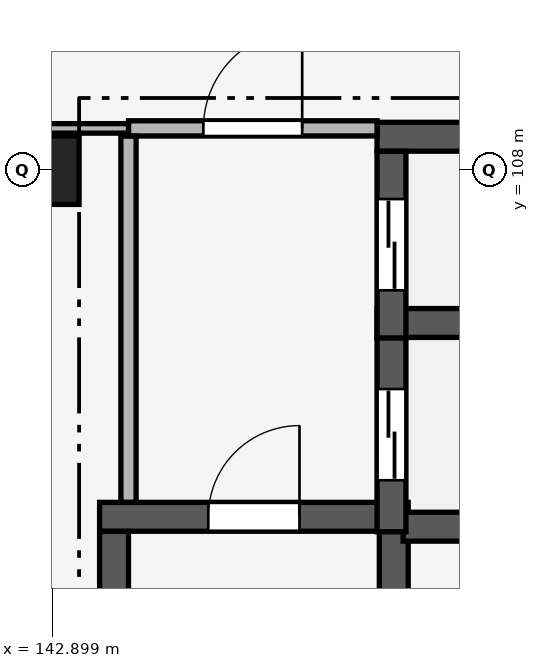
"""IFC4 building model, lengths in metres.
Left out: names, types, materials, properties, quantities, classifications, styles, units other than length and angle.
Written with IfcOpenShell. Run it as: python <this file> out.ifc"""

import sys

from ifc_helpers import new_model, si_unit, direction, frame, frame_2d, origin, origin_2d, place, context, subcontext, project, spatial, rectangle, extrude, element, fill, save


model = new_model("IFC4")
c1 = context("Model", 3, precision=1e-05, world=origin(), true_north=direction((0.0, 1.0)))
c2 = subcontext(c1, "Body", "Model", "MODEL_VIEW")
j1 = project(units=[si_unit("LENGTHUNIT", "METRE"), si_unit("PLANEANGLEUNIT", "RADIAN")], contexts=[c1])
p1 = place(None, origin())
s1 = spatial("IfcSite", under=j1, at=p1, CompositionType="ELEMENT")
p2 = place(p1, origin())
s2 = spatial("IfcBuilding", under=s1, at=p2, CompositionType="ELEMENT")
p3 = place(p2, frame((0.0, 0.0, -4.8)))
s3 = spatial("IfcBuildingStorey", under=s2, at=p3, CompositionType="ELEMENT", Elevation=-4.8)
p4 = place(p3, frame((142.8, 108.0, 0.0), z_axis=(0.0, 0.0, 1.0), x_axis=(1.0, 0.0, 0.0)))
e1 = element("IfcColumn", 1, at=p4, inside=s3, PredefinedType="COLUMN", context=c2, shape_type="SweptSolid", body=[
    extrude(rectangle(XDim=0.9, YDim=0.9, at=origin_2d()), origin(), (0.0, 0.0, 1.0), 4.8),
])
p5 = place(p3, frame((143.52, 103.44, 0.0), z_axis=(0.0, 0.0, 1.0), x_axis=(1.0, 0.0, 0.0)))
e2 = element("IfcWall", 2, at=p5, inside=s3, PredefinedType="SHEAR", context=c2, shape_type="SweptSolid", body=[
    extrude(rectangle(XDim=4.06, YDim=0.38, at=frame_2d((2.03, 0.0))), origin(), (0.0, 0.0, 1.0), 4.5),
])
p6 = place(p5, frame((1.43, 0.0, 0.0)))
e3 = element("IfcOpeningElement", 3, at=p6, cuts=e2, PredefinedType="OPENING", context=c2, shape_type="SweptSolid", body=[
    extrude(rectangle(XDim=1.2, YDim=2.2, at=frame_2d((0.6, 1.1))), frame((0.0, 0.205, 0.0), z_axis=(0.0, -1.0, 0.0), x_axis=(1.0, 0.0, 0.0)), (0.0, 0.0, 1.0), 0.41),
])
for number, where, z_axis, x_axis in (
    (4, (143.71, 96.352, 0.0), (0.0, 0.0, 1.0), (0.0, 1.0, 0.0)),
    (5, (147.39, 96.352, 0.0), (0.0, 0.0, 1.0), (0.0, 1.0, 0.0)),
):
    element("IfcWall", number, at=place(p3, frame(where, z_axis=z_axis, x_axis=x_axis)), inside=s3, PredefinedType="SHEAR", context=c2, shape_type="SweptSolid", body=[
        extrude(rectangle(XDim=6.896, YDim=0.38, at=frame_2d((3.448, 0.0))), origin(), (0.0, 0.0, 1.0), 4.5),
    ])
p7 = place(p3, frame((147.513, 103.31, 0.0), z_axis=(0.0, 0.0, 1.0), x_axis=(1.0, 0.0, 0.0)))
e6 = element("IfcWall", 6, at=p7, inside=s3, PredefinedType="SHEAR", context=c2, shape_type="SweptSolid", body=[
    extrude(rectangle(XDim=2.917, YDim=0.38, at=frame_2d((1.458, 0.0))), origin(), (0.0, 0.0, 1.0), 4.5),
])
p8 = place(p3, frame((147.17, 105.99, 0.0), z_axis=(0.0, 0.0, 1.0), x_axis=(1.0, 0.0, 0.0)))
e7 = element("IfcWall", 7, at=p8, inside=s3, PredefinedType="SHEAR", context=c2, shape_type="SweptSolid", body=[
    extrude(rectangle(XDim=3.26, YDim=0.38, at=frame_2d((1.63, 0.0))), origin(), (0.0, 0.0, 1.0), 4.5),
])
p9 = place(p3, frame((147.36, 103.243, 0.0), z_axis=(0.0, 0.0, 1.0), x_axis=(0.0, 1.0, 0.0)))
e8 = element("IfcWall", 8, at=p9, inside=s3, PredefinedType="SHEAR", context=c2, shape_type="SweptSolid", body=[
    extrude(rectangle(XDim=2.555, YDim=0.38, at=frame_2d((1.278, 0.0))), origin(), (0.0, 0.0, 1.0), 4.5),
])
p10 = place(p9, frame((0.678, 0.0, 0.0)))
e9 = element("IfcOpeningElement", 9, at=p10, cuts=e8, PredefinedType="OPENING", context=c2, shape_type="SweptSolid", body=[
    extrude(rectangle(XDim=1.2, YDim=2.15, at=frame_2d((0.6, 1.075))), frame((0.0, 0.205, 0.0), z_axis=(0.0, -1.0, 0.0), x_axis=(1.0, 0.0, 0.0)), (0.0, 0.0, 1.0), 0.41),
])
p11 = place(p3, frame((147.17, 108.44, 0.0), z_axis=(0.0, 0.0, 1.0), x_axis=(1.0, 0.0, 0.0)))
e10 = element("IfcWall", 10, at=p11, inside=s3, PredefinedType="SHEAR", context=c2, shape_type="SweptSolid", body=[
    extrude(rectangle(XDim=3.585, YDim=0.38, at=frame_2d((1.792, 0.0))), origin(), (0.0, 0.0, 1.0), 4.5),
])
p12 = place(p3, frame((147.36, 105.793, 0.0), z_axis=(0.0, 0.0, 1.0), x_axis=(0.0, 1.0, 0.0)))
e11 = element("IfcWall", 11, at=p12, inside=s3, PredefinedType="SHEAR", context=c2, shape_type="SweptSolid", body=[
    extrude(rectangle(XDim=2.455, YDim=0.38, at=frame_2d((1.228, 0.0))), origin(), (0.0, 0.0, 1.0), 4.5),
])
p13 = place(p12, frame((0.627, 0.0, 0.0)))
e12 = element("IfcOpeningElement", 12, at=p13, cuts=e11, PredefinedType="OPENING", context=c2, shape_type="SweptSolid", body=[
    extrude(rectangle(XDim=1.2, YDim=2.15, at=frame_2d((0.6, 1.075))), frame((0.0, 0.205, 0.0), z_axis=(0.0, -1.0, 0.0), x_axis=(1.0, 0.0, 0.0)), (0.0, 0.0, 1.0), 0.41),
])
p14 = place(p3, frame((143.9, 108.55, 0.0), z_axis=(0.0, 0.0, 1.0), x_axis=(1.0, 0.0, 0.0)))
e13 = element("IfcWall", 13, at=p14, inside=s3, PredefinedType="PARTITIONING", context=c2, shape_type="SweptSolid", body=[
    extrude(rectangle(XDim=3.27, YDim=0.2, at=frame_2d((1.635, 0.0))), origin(), (0.0, 0.0, 1.0), 4.5),
])
p15 = place(p14, frame((0.985, 0.0, 0.0)))
e14 = element("IfcOpeningElement", 14, at=p15, cuts=e13, PredefinedType="OPENING", context=c2, shape_type="SweptSolid", body=[
    extrude(rectangle(XDim=1.3, YDim=2.2, at=frame_2d((0.65, 1.1))), frame((0.0, 0.115, 0.0), z_axis=(0.0, -1.0, 0.0), x_axis=(1.0, 0.0, 0.0)), (0.0, 0.0, 1.0), 0.23),
])
p16 = place(p3, frame((142.355, 108.55, 0.0), z_axis=(0.0, 0.0, 1.0), x_axis=(1.0, 0.0, 0.0)))
e15 = element("IfcWall", 15, at=p16, inside=s3, PredefinedType="PARTITIONING", context=c2, shape_type="SweptSolid", body=[
    extrude(rectangle(XDim=1.545, YDim=0.125, at=frame_2d((0.772, 0.0))), origin(), (0.0, 0.0, 1.0), 3.85),
])
p17 = place(p3, frame((143.9, 103.632, 0.0), z_axis=(0.0, 0.0, 1.0), x_axis=(0.0, 1.0, 0.0)))
e16 = element("IfcWall", 16, at=p17, inside=s3, PredefinedType="PARTITIONING", context=c2, shape_type="SweptSolid", body=[
    extrude(rectangle(XDim=4.816, YDim=0.2, at=frame_2d((2.408, 0.0))), origin(), (0.0, 0.0, 1.0), 4.5),
])
p18 = place(p6, origin())
e17 = element("IfcDoor", 17, at=p18, inside=s3, OperationType="SINGLE_SWING_RIGHT", PredefinedType="DOOR", context=c2, shape_type="SweptSolid", body=[
    extrude(rectangle(XDim=1.2, YDim=2.2, at=frame_2d((0.6, 1.1))), frame((0.0, 0.025, 0.0), z_axis=(0.0, -1.0, 0.0), x_axis=(1.0, 0.0, 0.0)), (0.0, 0.0, 1.0), 0.05),
])
fill(e3, e17)
p19 = place(p10, origin())
e18 = element("IfcDoor", 18, at=p19, inside=s3, OperationType="DOUBLE_DOOR_SLIDING", PredefinedType="DOOR", context=c2, shape_type="SweptSolid", body=[
    extrude(rectangle(XDim=1.2, YDim=2.15, at=frame_2d((0.6, 1.075))), frame((0.0, 0.025, 0.0), z_axis=(0.0, -1.0, 0.0), x_axis=(1.0, 0.0, 0.0)), (0.0, 0.0, 1.0), 0.05),
])
fill(e9, e18)
p20 = place(p13, origin())
e19 = element("IfcDoor", 19, at=p20, inside=s3, OperationType="DOUBLE_DOOR_SLIDING", PredefinedType="DOOR", context=c2, shape_type="SweptSolid", body=[
    extrude(rectangle(XDim=1.2, YDim=2.15, at=frame_2d((0.6, 1.075))), frame((0.0, 0.025, 0.0), z_axis=(0.0, -1.0, 0.0), x_axis=(1.0, 0.0, 0.0)), (0.0, 0.0, 1.0), 0.05),
])
fill(e12, e19)
p21 = place(p15, origin())
e20 = element("IfcDoor", 20, at=p21, inside=s3, OperationType="SINGLE_SWING_RIGHT", PredefinedType="DOOR", context=c2, shape_type="SweptSolid", body=[
    extrude(rectangle(XDim=1.3, YDim=2.2, at=frame_2d((0.65, 1.1))), frame((0.0, 0.025, 0.0), z_axis=(0.0, -1.0, 0.0), x_axis=(1.0, 0.0, 0.0)), (0.0, 0.0, 1.0), 0.05),
])
fill(e14, e20)
save(model, sys.argv[1])
